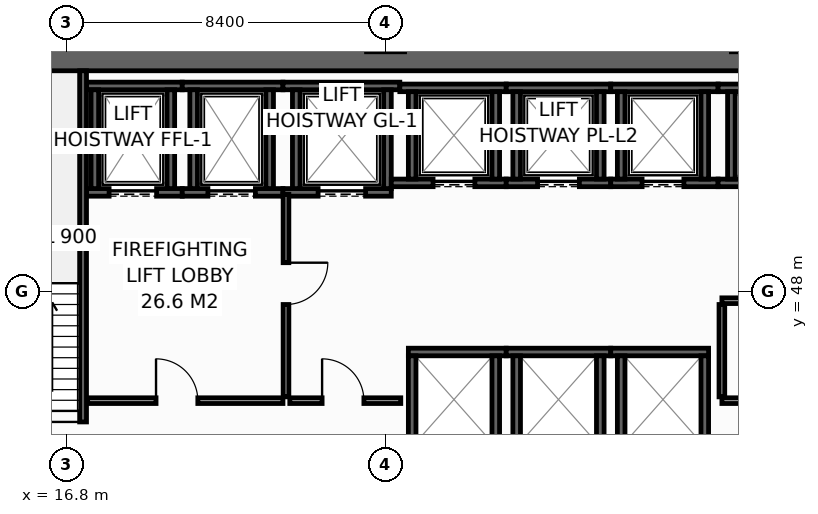
"""IFC4 building model, lengths in metres.
Left out: names, types, materials, properties, quantities, classifications, styles, units other than length and angle.
Written with IfcOpenShell. Run it as: python <this file> out.ifc"""

import sys

from ifc_helpers import new_model, si_unit, direction, frame, frame_2d, origin, place, context, subcontext, project, spatial, rectangle, extrude, element, fill, save


model = new_model("IFC4")
c1 = context("Model", 3, precision=1e-05, world=origin(), true_north=direction((0.0, 1.0)))
c2 = subcontext(c1, "Body", "Model", "MODEL_VIEW")
j1 = project(units=[si_unit("LENGTHUNIT", "METRE"), si_unit("PLANEANGLEUNIT", "RADIAN")], contexts=[c1])
p1 = place(None, origin())
s1 = spatial("IfcSite", under=j1, at=p1, CompositionType="ELEMENT")
p2 = place(p1, origin())
s2 = spatial("IfcBuilding", under=s1, at=p2, CompositionType="ELEMENT")
p3 = place(p2, frame((0.0, 0.0, 114.8)))
s3 = spatial("IfcBuildingStorey", under=s2, at=p3, CompositionType="ELEMENT", Elevation=114.8)
p4 = place(p3, frame((13.5, 54.1, 0.0), z_axis=(0.0, 0.0, 1.0), x_axis=(1.0, 0.0, 0.0)))
e1 = element("IfcWall", 1, at=p4, inside=s3, PredefinedType="SHEAR", context=c2, shape_type="SweptSolid", body=[
    extrude(rectangle(XDim=32.9, YDim=0.6, at=frame_2d((16.45, 0.0))), origin(), (0.0, 0.0, 1.0), 4.15),
])
p5 = place(p3, frame((17.33, 50.6, 0.0), z_axis=(0.0, 0.0, 1.0), x_axis=(1.0, 0.0, 0.0)))
e2 = element("IfcWall", 2, at=p5, inside=s3, PredefinedType="SHEAR", context=c2, shape_type="SweptSolid", body=[
    extrude(rectangle(XDim=2.52, YDim=0.2, at=frame_2d((1.26, 0.0))), origin(), (0.0, 0.0, 1.0), 4.15),
])
p6 = place(p5, frame((0.595, 0.0, 0.0)))
e3 = element("IfcOpeningElement", 3, at=p6, cuts=e2, PredefinedType="OPENING", context=c2, shape_type="SweptSolid", body=[
    extrude(rectangle(XDim=1.25, YDim=2.3, at=frame_2d((0.625, 1.15))), frame((0.0, 0.11, 0.0), z_axis=(0.0, -1.0, 0.0), x_axis=(1.0, 0.0, 0.0)), (0.0, 0.0, 1.0), 0.22),
])
p7 = place(p3, frame((17.33, 53.4, 0.0), z_axis=(0.0, 0.0, 1.0), x_axis=(1.0, 0.0, 0.0)))
e4 = element("IfcWall", 4, at=p7, inside=s3, PredefinedType="SHEAR", context=c2, shape_type="SweptSolid", body=[
    extrude(rectangle(XDim=2.52, YDim=0.2, at=frame_2d((1.26, 0.0))), origin(), (0.0, 0.0, 1.0), 4.15),
])
for number, where, z_axis, x_axis in (
    (5, (17.55, 50.7, 0.0), (0.0, 0.0, 1.0), (0.0, 1.0, 0.0)),
    (6, (19.55, 50.7, 0.0), (0.0, 0.0, 1.0), (0.0, 1.0, 0.0)),
):
    element("IfcWall", number, at=place(p3, frame(where, z_axis=z_axis, x_axis=x_axis)), inside=s3, PredefinedType="SHEAR", context=c2, shape_type="SweptSolid", body=[
        extrude(rectangle(XDim=2.6, YDim=0.2, at=frame_2d((1.3, 0.0))), origin(), (0.0, 0.0, 1.0), 4.15),
    ])
p8 = place(p3, frame((19.85, 50.6, 0.0), z_axis=(0.0, 0.0, 1.0), x_axis=(1.0, 0.0, 0.0)))
e7 = element("IfcWall", 7, at=p8, inside=s3, PredefinedType="SHEAR", context=c2, shape_type="SweptSolid", body=[
    extrude(rectangle(XDim=2.65, YDim=0.2, at=frame_2d((1.325, 0.0))), origin(), (0.0, 0.0, 1.0), 4.15),
])
p9 = place(p8, frame((0.675, 0.0, 0.0)))
e8 = element("IfcOpeningElement", 8, at=p9, cuts=e7, PredefinedType="OPENING", context=c2, shape_type="SweptSolid", body=[
    extrude(rectangle(XDim=1.25, YDim=2.3, at=frame_2d((0.625, 1.15))), frame((0.0, 0.11, 0.0), z_axis=(0.0, -1.0, 0.0), x_axis=(1.0, 0.0, 0.0)), (0.0, 0.0, 1.0), 0.22),
])
p10 = place(p3, frame((19.85, 53.4, 0.0), z_axis=(0.0, 0.0, 1.0), x_axis=(1.0, 0.0, 0.0)))
e9 = element("IfcWall", 9, at=p10, inside=s3, PredefinedType="SHEAR", context=c2, shape_type="SweptSolid", body=[
    extrude(rectangle(XDim=2.65, YDim=0.2, at=frame_2d((1.325, 0.0))), origin(), (0.0, 0.0, 1.0), 4.15),
])
for number, where, z_axis, x_axis in (
    (10, (20.15, 50.7, 0.0), (0.0, 0.0, 1.0), (0.0, 1.0, 0.0)),
    (11, (22.15, 50.7, 0.0), (0.0, 0.0, 1.0), (0.0, 1.0, 0.0)),
):
    element("IfcWall", number, at=place(p3, frame(where, z_axis=z_axis, x_axis=x_axis)), inside=s3, PredefinedType="SHEAR", context=c2, shape_type="SweptSolid", body=[
        extrude(rectangle(XDim=2.6, YDim=0.2, at=frame_2d((1.3, 0.0))), origin(), (0.0, 0.0, 1.0), 4.15),
    ])
p11 = place(p3, frame((22.5, 50.6, 0.0), z_axis=(0.0, 0.0, 1.0), x_axis=(1.0, 0.0, 0.0)))
e12 = element("IfcWall", 12, at=p11, inside=s3, PredefinedType="SHEAR", context=c2, shape_type="SweptSolid", body=[
    extrude(rectangle(XDim=2.85, YDim=0.2, at=frame_2d((1.425, 0.0))), origin(), (0.0, 0.0, 1.0), 4.15),
])
p12 = place(p11, frame((0.925, 0.0, 0.0)))
e13 = element("IfcOpeningElement", 13, at=p12, cuts=e12, PredefinedType="OPENING", context=c2, shape_type="SweptSolid", body=[
    extrude(rectangle(XDim=1.25, YDim=2.3, at=frame_2d((0.625, 1.15))), frame((0.0, 0.11, 0.0), z_axis=(0.0, -1.0, 0.0), x_axis=(1.0, 0.0, 0.0)), (0.0, 0.0, 1.0), 0.22),
])
p13 = place(p3, frame((22.5, 53.4, 0.0), z_axis=(0.0, 0.0, 1.0), x_axis=(1.0, 0.0, 0.0)))
e14 = element("IfcWall", 14, at=p13, inside=s3, PredefinedType="SHEAR", context=c2, shape_type="SweptSolid", body=[
    extrude(rectangle(XDim=3.075, YDim=0.2, at=frame_2d((1.538, 0.0))), origin(), (0.0, 0.0, 1.0), 4.15),
])
for number, where, z_axis, x_axis in (
    (15, (22.85, 50.7, 0.0), (0.0, 0.0, 1.0), (0.0, 1.0, 0.0)),
    (16, (25.25, 50.7, 0.0), (0.0, 0.0, 1.0), (0.0, 1.0, 0.0)),
):
    element("IfcWall", number, at=place(p3, frame(where, z_axis=z_axis, x_axis=x_axis)), inside=s3, PredefinedType="SHEAR", context=c2, shape_type="SweptSolid", body=[
        extrude(rectangle(XDim=2.6, YDim=0.2, at=frame_2d((1.3, 0.0))), origin(), (0.0, 0.0, 1.0), 4.15),
    ])
p14 = place(p3, frame((25.35, 50.85, 0.0), z_axis=(0.0, 0.0, 1.0), x_axis=(1.0, 0.0, 0.0)))
e17 = element("IfcWall", 17, at=p14, inside=s3, PredefinedType="SHEAR", context=c2, shape_type="SweptSolid", body=[
    extrude(rectangle(XDim=3.025, YDim=0.2, at=frame_2d((1.512, 0.0))), origin(), (0.0, 0.0, 1.0), 4.15),
])
p15 = place(p14, frame((1.1, 0.0, 0.0)))
e18 = element("IfcOpeningElement", 18, at=p15, cuts=e17, PredefinedType="OPENING", context=c2, shape_type="SweptSolid", body=[
    extrude(rectangle(XDim=1.1, YDim=2.2, at=frame_2d((0.55, 1.1))), frame((0.0, 0.11, 0.0), z_axis=(0.0, -1.0, 0.0), x_axis=(1.0, 0.0, 0.0)), (0.0, 0.0, 1.0), 0.22),
])
p16 = place(p3, frame((25.575, 53.35, 0.0), z_axis=(0.0, 0.0, 1.0), x_axis=(1.0, 0.0, 0.0)))
e19 = element("IfcWall", 19, at=p16, inside=s3, PredefinedType="SHEAR", context=c2, shape_type="SweptSolid", body=[
    extrude(rectangle(XDim=2.8, YDim=0.2, at=frame_2d((1.4, 0.0))), origin(), (0.0, 0.0, 1.0), 4.15),
])
for number, where, z_axis, x_axis in (
    (20, (25.9, 50.95, 0.0), (0.0, 0.0, 1.0), (0.0, 1.0, 0.0)),
    (21, (28.1, 50.95, 0.0), (0.0, 0.0, 1.0), (0.0, 1.0, 0.0)),
):
    element("IfcWall", number, at=place(p3, frame(where, z_axis=z_axis, x_axis=x_axis)), inside=s3, PredefinedType="SHEAR", context=c2, shape_type="SweptSolid", body=[
        extrude(rectangle(XDim=2.3, YDim=0.2, at=frame_2d((1.15, 0.0))), origin(), (0.0, 0.0, 1.0), 4.15),
    ])
p17 = place(p3, frame((28.375, 50.85, 0.0), z_axis=(0.0, 0.0, 1.0), x_axis=(1.0, 0.0, 0.0)))
e22 = element("IfcWall", 22, at=p17, inside=s3, PredefinedType="SHEAR", context=c2, shape_type="SweptSolid", body=[
    extrude(rectangle(XDim=2.75, YDim=0.2, at=frame_2d((1.375, 0.0))), origin(), (0.0, 0.0, 1.0), 4.15),
])
p18 = place(p17, frame((0.825, 0.0, 0.0)))
e23 = element("IfcOpeningElement", 23, at=p18, cuts=e22, PredefinedType="OPENING", context=c2, shape_type="SweptSolid", body=[
    extrude(rectangle(XDim=1.1, YDim=2.2, at=frame_2d((0.55, 1.1))), frame((0.0, 0.11, 0.0), z_axis=(0.0, -1.0, 0.0), x_axis=(1.0, 0.0, 0.0)), (0.0, 0.0, 1.0), 0.22),
])
p19 = place(p3, frame((28.375, 53.35, 0.0), z_axis=(0.0, 0.0, 1.0), x_axis=(1.0, 0.0, 0.0)))
e24 = element("IfcWall", 24, at=p19, inside=s3, PredefinedType="SHEAR", context=c2, shape_type="SweptSolid", body=[
    extrude(rectangle(XDim=2.75, YDim=0.2, at=frame_2d((1.375, 0.0))), origin(), (0.0, 0.0, 1.0), 4.15),
])
for number, where, z_axis, x_axis in (
    (25, (28.65, 50.95, 0.0), (0.0, 0.0, 1.0), (0.0, 1.0, 0.0)),
    (26, (30.85, 50.95, 0.0), (0.0, 0.0, 1.0), (0.0, 1.0, 0.0)),
):
    element("IfcWall", number, at=place(p3, frame(where, z_axis=z_axis, x_axis=x_axis)), inside=s3, PredefinedType="SHEAR", context=c2, shape_type="SweptSolid", body=[
        extrude(rectangle(XDim=2.3, YDim=0.2, at=frame_2d((1.15, 0.0))), origin(), (0.0, 0.0, 1.0), 4.15),
    ])
p20 = place(p3, frame((31.125, 50.85, 0.0), z_axis=(0.0, 0.0, 1.0), x_axis=(1.0, 0.0, 0.0)))
e27 = element("IfcWall", 27, at=p20, inside=s3, PredefinedType="SHEAR", context=c2, shape_type="SweptSolid", body=[
    extrude(rectangle(XDim=2.825, YDim=0.2, at=frame_2d((1.413, 0.0))), origin(), (0.0, 0.0, 1.0), 4.15),
])
p21 = place(p20, frame((0.825, 0.0, 0.0)))
e28 = element("IfcOpeningElement", 28, at=p21, cuts=e27, PredefinedType="OPENING", context=c2, shape_type="SweptSolid", body=[
    extrude(rectangle(XDim=1.1, YDim=2.2, at=frame_2d((0.55, 1.1))), frame((0.0, 0.11, 0.0), z_axis=(0.0, -1.0, 0.0), x_axis=(1.0, 0.0, 0.0)), (0.0, 0.0, 1.0), 0.22),
])
p22 = place(p3, frame((31.125, 53.35, 0.0), z_axis=(0.0, 0.0, 1.0), x_axis=(1.0, 0.0, 0.0)))
e29 = element("IfcWall", 29, at=p22, inside=s3, PredefinedType="SHEAR", context=c2, shape_type="SweptSolid", body=[
    extrude(rectangle(XDim=2.825, YDim=0.2, at=frame_2d((1.413, 0.0))), origin(), (0.0, 0.0, 1.0), 4.15),
])
for number, where, z_axis, x_axis in (
    (30, (31.4, 50.95, 0.0), (0.0, 0.0, 1.0), (0.0, 1.0, 0.0)),
    (31, (33.6, 50.95, 0.0), (0.0, 0.0, 1.0), (0.0, 1.0, 0.0)),
):
    element("IfcWall", number, at=place(p3, frame(where, z_axis=z_axis, x_axis=x_axis)), inside=s3, PredefinedType="SHEAR", context=c2, shape_type="SweptSolid", body=[
        extrude(rectangle(XDim=2.3, YDim=0.2, at=frame_2d((1.15, 0.0))), origin(), (0.0, 0.0, 1.0), 4.15),
    ])
p23 = place(p3, frame((25.8, 46.4, 0.0), z_axis=(0.0, 0.0, 1.0), x_axis=(1.0, 0.0, 0.0)))
e32 = element("IfcWall", 32, at=p23, inside=s3, PredefinedType="SHEAR", context=c2, shape_type="SweptSolid", body=[
    extrude(rectangle(XDim=2.575, YDim=0.2, at=frame_2d((1.288, 0.0))), origin(), (0.0, 0.0, 1.0), 4.15),
])
for number, where, z_axis, x_axis in (
    (33, (25.9, 44.0, 0.0), (0.0, 0.0, 1.0), (0.0, 1.0, 0.0)),
    (34, (28.1, 44.0, 0.0), (0.0, 0.0, 1.0), (0.0, 1.0, 0.0)),
):
    element("IfcWall", number, at=place(p3, frame(where, z_axis=z_axis, x_axis=x_axis)), inside=s3, PredefinedType="SHEAR", context=c2, shape_type="SweptSolid", body=[
        extrude(rectangle(XDim=2.3, YDim=0.2, at=frame_2d((1.15, 0.0))), origin(), (0.0, 0.0, 1.0), 4.15),
    ])
p24 = place(p3, frame((28.375, 46.4, 0.0), z_axis=(0.0, 0.0, 1.0), x_axis=(1.0, 0.0, 0.0)))
e35 = element("IfcWall", 35, at=p24, inside=s3, PredefinedType="SHEAR", context=c2, shape_type="SweptSolid", body=[
    extrude(rectangle(XDim=2.75, YDim=0.2, at=frame_2d((1.375, 0.0))), origin(), (0.0, 0.0, 1.0), 4.15),
])
for number, where, z_axis, x_axis in (
    (36, (28.65, 44.0, 0.0), (0.0, 0.0, 1.0), (0.0, 1.0, 0.0)),
    (37, (30.85, 44.0, 0.0), (0.0, 0.0, 1.0), (0.0, 1.0, 0.0)),
):
    element("IfcWall", number, at=place(p3, frame(where, z_axis=z_axis, x_axis=x_axis)), inside=s3, PredefinedType="SHEAR", context=c2, shape_type="SweptSolid", body=[
        extrude(rectangle(XDim=2.3, YDim=0.2, at=frame_2d((1.15, 0.0))), origin(), (0.0, 0.0, 1.0), 4.15),
    ])
p25 = place(p3, frame((31.125, 46.4, 0.0), z_axis=(0.0, 0.0, 1.0), x_axis=(1.0, 0.0, 0.0)))
e38 = element("IfcWall", 38, at=p25, inside=s3, PredefinedType="SHEAR", context=c2, shape_type="SweptSolid", body=[
    extrude(rectangle(XDim=2.575, YDim=0.2, at=frame_2d((1.288, 0.0))), origin(), (0.0, 0.0, 1.0), 4.15),
])
for number, where, z_axis, x_axis in (
    (39, (31.4, 44.0, 0.0), (0.0, 0.0, 1.0), (0.0, 1.0, 0.0)),
    (40, (33.6, 44.0, 0.0), (0.0, 0.0, 1.0), (0.0, 1.0, 0.0)),
):
    element("IfcWall", number, at=place(p3, frame(where, z_axis=z_axis, x_axis=x_axis)), inside=s3, PredefinedType="SHEAR", context=c2, shape_type="SweptSolid", body=[
        extrude(rectangle(XDim=2.3, YDim=0.2, at=frame_2d((1.15, 0.0))), origin(), (0.0, 0.0, 1.0), 4.15),
    ])
for number, where, z_axis, x_axis in (
    (41, (33.95, 50.85, 0.0), (0.0, 0.0, 1.0), (1.0, 0.0, 0.0)),
    (42, (33.95, 53.35, 0.0), (0.0, 0.0, 1.0), (1.0, 0.0, 0.0)),
):
    element("IfcWall", number, at=place(p3, frame(where, z_axis=z_axis, x_axis=x_axis)), inside=s3, PredefinedType="SHEAR", context=c2, shape_type="SweptSolid", body=[
        extrude(rectangle(XDim=2.825, YDim=0.2, at=frame_2d((1.413, 0.0))), origin(), (0.0, 0.0, 1.0), 4.15),
    ])
p26 = place(p3, frame((34.3, 50.95, 0.0), z_axis=(0.0, 0.0, 1.0), x_axis=(0.0, 1.0, 0.0)))
e43 = element("IfcWall", 43, at=p26, inside=s3, PredefinedType="SHEAR", context=c2, shape_type="SweptSolid", body=[
    extrude(rectangle(XDim=2.3, YDim=0.2, at=frame_2d((1.15, 0.0))), origin(), (0.0, 0.0, 1.0), 4.15),
])
p27 = place(p3, frame((17.24, 43.4, 0.0), z_axis=(0.0, 0.0, 1.0), x_axis=(0.0, 1.0, 0.0)))
e44 = element("IfcWall", 44, at=p27, inside=s3, PredefinedType="SHEAR", context=c2, shape_type="SweptSolid", body=[
    extrude(rectangle(XDim=10.4, YDim=0.18, at=frame_2d((5.2, 0.0))), origin(), (0.0, 0.0, 1.0), 4.15),
])
p28 = place(p27, frame((0.16, 0.0, 0.0)))
e45 = element("IfcOpeningElement", 45, at=p28, cuts=e44, PredefinedType="OPENING", context=c2, shape_type="SweptSolid", body=[
    extrude(rectangle(XDim=1.0, YDim=2.15, at=frame_2d((0.5, 1.075))), frame((0.0, 0.1, 0.0), z_axis=(0.0, -1.0, 0.0), x_axis=(1.0, 0.0, 0.0)), (0.0, 0.0, 1.0), 0.2),
])
p29 = place(p3, frame((17.36, 45.12, 0.0), z_axis=(0.0, 0.0, 1.0), x_axis=(1.0, 0.0, 0.0)))
e46 = element("IfcWall", 46, at=p29, inside=s3, PredefinedType="PARTITIONING", context=c2, shape_type="SweptSolid", body=[
    extrude(rectangle(XDim=5.14, YDim=0.15, at=frame_2d((2.57, 0.0))), origin(), (0.0, 0.0, 1.0), 4.15),
])
p30 = place(p29, frame((1.8, 0.0, 0.0)))
e47 = element("IfcOpeningElement", 47, at=p30, cuts=e46, PredefinedType="OPENING", context=c2, shape_type="SweptSolid", body=[
    extrude(rectangle(XDim=1.1, YDim=2.15, at=frame_2d((0.55, 1.075))), frame((0.0, 0.085, 0.0), z_axis=(0.0, -1.0, 0.0), x_axis=(1.0, 0.0, 0.0)), (0.0, 0.0, 1.0), 0.17),
])
p31 = place(p3, frame((22.58, 50.55, 0.0), z_axis=(0.0, 0.0, 1.0), x_axis=(0.0, -1.0, 0.0)))
e48 = element("IfcWall", 48, at=p31, inside=s3, PredefinedType="PARTITIONING", context=c2, shape_type="SweptSolid", body=[
    extrude(rectangle(XDim=5.33, YDim=0.15, at=frame_2d((2.665, 0.0))), origin(), (0.0, 0.0, 1.0), 4.15),
])
p32 = place(p31, frame((1.8, 0.0, 0.0)))
e49 = element("IfcOpeningElement", 49, at=p32, cuts=e48, PredefinedType="OPENING", context=c2, shape_type="SweptSolid", body=[
    extrude(rectangle(XDim=1.1, YDim=2.15, at=frame_2d((0.55, 1.075))), frame((0.0, 0.085, 0.0), z_axis=(0.0, -1.0, 0.0), x_axis=(1.0, 0.0, 0.0)), (0.0, 0.0, 1.0), 0.17),
])
p33 = place(p3, frame((22.68, 45.12, 0.0), z_axis=(0.0, 0.0, 1.0), x_axis=(1.0, 0.0, 0.0)))
e50 = element("IfcWall", 50, at=p33, inside=s3, PredefinedType="PARTITIONING", context=c2, shape_type="SweptSolid", body=[
    extrude(rectangle(XDim=2.92, YDim=0.15, at=frame_2d((1.46, 0.0))), origin(), (0.0, 0.0, 1.0), 4.15),
])
p34 = place(p33, frame((0.85, 0.0, 0.0)))
e51 = element("IfcOpeningElement", 51, at=p34, cuts=e50, PredefinedType="OPENING", context=c2, shape_type="SweptSolid", body=[
    extrude(rectangle(XDim=1.1, YDim=2.15, at=frame_2d((0.55, 1.075))), frame((0.0, 0.085, 0.0), z_axis=(0.0, -1.0, 0.0), x_axis=(1.0, 0.0, 0.0)), (0.0, 0.0, 1.0), 0.17),
])
p35 = place(p3, frame((34.05, 45.12, 0.0), z_axis=(0.0, 0.0, 1.0), x_axis=(1.0, 0.0, 0.0)))
e52 = element("IfcWall", 52, at=p35, inside=s3, PredefinedType="PARTITIONING", context=c2, shape_type="SweptSolid", body=[
    extrude(rectangle(XDim=8.45, YDim=0.15, at=frame_2d((4.225, 0.0))), origin(), (0.0, 0.0, 1.0), 4.15),
])
p36 = place(p35, frame((3.6, 0.0, 0.0)))
e53 = element("IfcOpeningElement", 53, at=p36, cuts=e52, PredefinedType="OPENING", context=c2, shape_type="SweptSolid", body=[
    extrude(rectangle(XDim=0.95, YDim=2.15, at=frame_2d((0.475, 1.075))), frame((0.0, 0.085, 0.0), z_axis=(0.0, -1.0, 0.0), x_axis=(1.0, 0.0, 0.0)), (0.0, 0.0, 1.0), 0.17),
])
p37 = place(p3, frame((34.05, 47.75, 0.0), z_axis=(0.0, 0.0, 1.0), x_axis=(1.0, 0.0, 0.0)))
e54 = element("IfcWall", 54, at=p37, inside=s3, PredefinedType="PARTITIONING", context=c2, shape_type="SweptSolid", body=[
    extrude(rectangle(XDim=8.45, YDim=0.15, at=frame_2d((4.225, 0.0))), origin(), (0.0, 0.0, 1.0), 4.15),
])
p38 = place(p3, frame((34.05, 45.22, 0.0), z_axis=(0.0, 0.0, 1.0), x_axis=(0.0, 1.0, 0.0)))
e55 = element("IfcWall", 55, at=p38, inside=s3, PredefinedType="PARTITIONING", context=c2, shape_type="SweptSolid", body=[
    extrude(rectangle(XDim=2.43, YDim=0.15, at=frame_2d((1.215, 0.0))), origin(), (0.0, 0.0, 1.0), 4.15),
])
p39 = place(p6, origin())
e56 = element("IfcDoor", 56, at=p39, inside=s3, OperationType="SLIDING_TO_LEFT", PredefinedType="DOOR", context=c2, shape_type="SweptSolid", body=[
    extrude(rectangle(XDim=1.25, YDim=2.3, at=frame_2d((0.625, 1.15))), frame((0.0, 0.025, 0.0), z_axis=(0.0, -1.0, 0.0), x_axis=(1.0, 0.0, 0.0)), (0.0, 0.0, 1.0), 0.05),
])
fill(e3, e56)
p40 = place(p9, origin())
e57 = element("IfcDoor", 57, at=p40, inside=s3, OperationType="SLIDING_TO_LEFT", PredefinedType="DOOR", context=c2, shape_type="SweptSolid", body=[
    extrude(rectangle(XDim=1.25, YDim=2.3, at=frame_2d((0.625, 1.15))), frame((0.0, 0.025, 0.0), z_axis=(0.0, -1.0, 0.0), x_axis=(1.0, 0.0, 0.0)), (0.0, 0.0, 1.0), 0.05),
])
fill(e8, e57)
p41 = place(p12, origin())
e58 = element("IfcDoor", 58, at=p41, inside=s3, OperationType="SLIDING_TO_LEFT", PredefinedType="DOOR", context=c2, shape_type="SweptSolid", body=[
    extrude(rectangle(XDim=1.25, YDim=2.3, at=frame_2d((0.625, 1.15))), frame((0.0, 0.025, 0.0), z_axis=(0.0, -1.0, 0.0), x_axis=(1.0, 0.0, 0.0)), (0.0, 0.0, 1.0), 0.05),
])
fill(e13, e58)
p42 = place(p15, origin())
e59 = element("IfcDoor", 59, at=p42, inside=s3, OperationType="SLIDING_TO_LEFT", PredefinedType="DOOR", context=c2, shape_type="SweptSolid", body=[
    extrude(rectangle(XDim=1.1, YDim=2.2, at=frame_2d((0.55, 1.1))), frame((0.0, 0.025, 0.0), z_axis=(0.0, -1.0, 0.0), x_axis=(1.0, 0.0, 0.0)), (0.0, 0.0, 1.0), 0.05),
])
fill(e18, e59)
p43 = place(p18, origin())
e60 = element("IfcDoor", 60, at=p43, inside=s3, OperationType="SLIDING_TO_LEFT", PredefinedType="DOOR", context=c2, shape_type="SweptSolid", body=[
    extrude(rectangle(XDim=1.1, YDim=2.2, at=frame_2d((0.55, 1.1))), frame((0.0, 0.025, 0.0), z_axis=(0.0, -1.0, 0.0), x_axis=(1.0, 0.0, 0.0)), (0.0, 0.0, 1.0), 0.05),
])
fill(e23, e60)
p44 = place(p21, origin())
e61 = element("IfcDoor", 61, at=p44, inside=s3, OperationType="SLIDING_TO_LEFT", PredefinedType="DOOR", context=c2, shape_type="SweptSolid", body=[
    extrude(rectangle(XDim=1.1, YDim=2.2, at=frame_2d((0.55, 1.1))), frame((0.0, 0.025, 0.0), z_axis=(0.0, -1.0, 0.0), x_axis=(1.0, 0.0, 0.0)), (0.0, 0.0, 1.0), 0.05),
])
fill(e28, e61)
p45 = place(p28, origin())
e62 = element("IfcDoor", 62, at=p45, inside=s3, OperationType="SINGLE_SWING_RIGHT", PredefinedType="DOOR", context=c2, shape_type="SweptSolid", body=[
    extrude(rectangle(XDim=1.0, YDim=2.15, at=frame_2d((0.5, 1.075))), frame((0.0, 0.025, 0.0), z_axis=(0.0, -1.0, 0.0), x_axis=(1.0, 0.0, 0.0)), (0.0, 0.0, 1.0), 0.05),
])
fill(e45, e62)
p46 = place(p30, origin())
e63 = element("IfcDoor", 63, at=p46, inside=s3, OperationType="SINGLE_SWING_LEFT", PredefinedType="DOOR", context=c2, shape_type="SweptSolid", body=[
    extrude(rectangle(XDim=1.1, YDim=2.15, at=frame_2d((0.55, 1.075))), frame((0.0, 0.025, 0.0), z_axis=(0.0, -1.0, 0.0), x_axis=(1.0, 0.0, 0.0)), (0.0, 0.0, 1.0), 0.05),
])
fill(e47, e63)
p47 = place(p32, origin())
e64 = element("IfcDoor", 64, at=p47, inside=s3, OperationType="SINGLE_SWING_LEFT", PredefinedType="DOOR", context=c2, shape_type="SweptSolid", body=[
    extrude(rectangle(XDim=1.1, YDim=2.15, at=frame_2d((0.55, 1.075))), frame((0.0, 0.025, 0.0), z_axis=(0.0, -1.0, 0.0), x_axis=(1.0, 0.0, 0.0)), (0.0, 0.0, 1.0), 0.05),
])
fill(e49, e64)
p48 = place(p34, origin())
e65 = element("IfcDoor", 65, at=p48, inside=s3, OperationType="SINGLE_SWING_LEFT", PredefinedType="DOOR", context=c2, shape_type="SweptSolid", body=[
    extrude(rectangle(XDim=1.1, YDim=2.15, at=frame_2d((0.55, 1.075))), frame((0.0, 0.025, 0.0), z_axis=(0.0, -1.0, 0.0), x_axis=(1.0, 0.0, 0.0)), (0.0, 0.0, 1.0), 0.05),
])
fill(e51, e65)
save(model, sys.argv[1])
